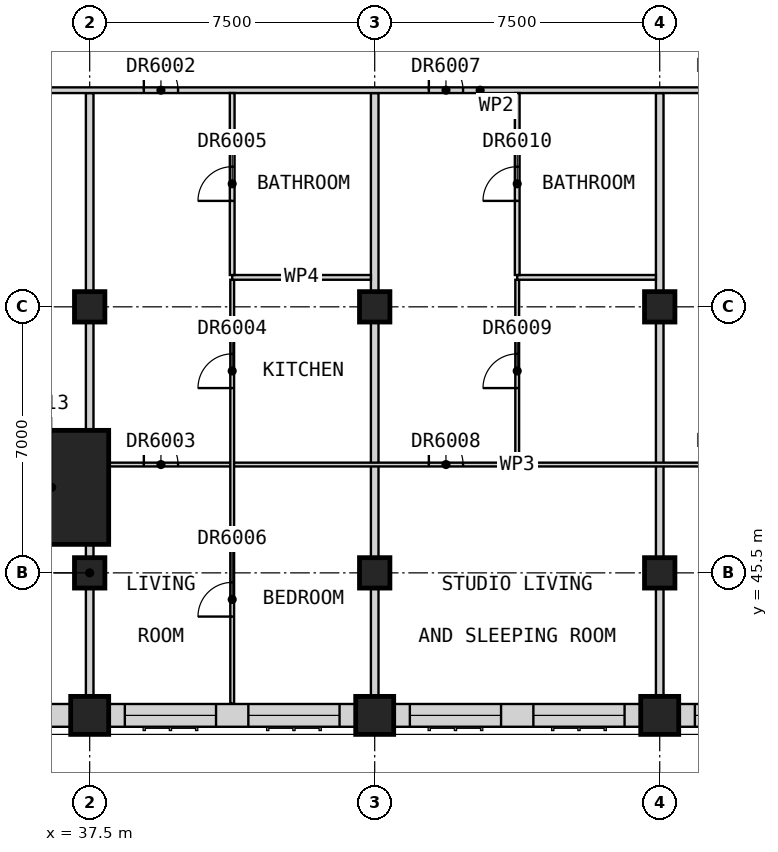
"""IFC4 building model, lengths in metres.
Left out: names, types, materials, properties, quantities, classifications, styles, units other than length and angle.
Written with IfcOpenShell. Run it as: python <this file> out.ifc"""

import sys

from ifc_helpers import new_model, si_unit, direction, frame, frame_2d, origin, origin_2d, place, context, subcontext, project, spatial, rectangle, extrude, element, fill, save


model = new_model("IFC4")
c1 = context("Model", 3, precision=1e-05, world=origin(), true_north=direction((0.0, 1.0)))
c2 = subcontext(c1, "Body", "Model", "MODEL_VIEW")
j1 = project(units=[si_unit("LENGTHUNIT", "METRE"), si_unit("PLANEANGLEUNIT", "RADIAN")], contexts=[c1])
p1 = place(None, origin())
s1 = spatial("IfcSite", under=j1, at=p1, CompositionType="ELEMENT")
p2 = place(p1, origin())
s2 = spatial("IfcBuilding", under=s1, at=p2, CompositionType="ELEMENT")
p3 = place(p2, frame((0.0, 0.0, 254.7)))
s3 = spatial("IfcBuildingStorey", under=s2, at=p3, CompositionType="ELEMENT", Elevation=254.7)
for number, where, z_axis, x_axis in (
    (1, (37.5, 41.75, 0.0), (0.0, 0.0, 1.0), (1.0, 0.0, 0.0)),
    (2, (45.0, 41.75, 0.0), (0.0, 0.0, 1.0), (1.0, 0.0, 0.0)),
    (3, (52.5, 41.75, 0.0), (0.0, 0.0, 1.0), (1.0, 0.0, 0.0)),
):
    element("IfcColumn", number, at=place(p3, frame(where, z_axis=z_axis, x_axis=x_axis)), inside=s3, PredefinedType="COLUMN", context=c2, shape_type="SweptSolid", body=[
        extrude(rectangle(XDim=1.0, YDim=1.0, at=origin_2d()), origin(), (0.0, 0.0, 1.0), 3.5),
    ])
for number, where, z_axis, x_axis in (
    (4, (37.5, 45.5, 0.0), (0.0, 0.0, 1.0), (1.0, 0.0, 0.0)),
    (5, (37.5, 52.5, 0.0), (0.0, 0.0, 1.0), (1.0, 0.0, 0.0)),
    (6, (45.0, 45.5, 0.0), (0.0, 0.0, 1.0), (1.0, 0.0, 0.0)),
    (7, (45.0, 52.5, 0.0), (0.0, 0.0, 1.0), (1.0, 0.0, 0.0)),
    (8, (52.5, 45.5, 0.0), (0.0, 0.0, 1.0), (1.0, 0.0, 0.0)),
    (9, (52.5, 52.5, 0.0), (0.0, 0.0, 1.0), (1.0, 0.0, 0.0)),
):
    element("IfcColumn", number, at=place(p3, frame(where, z_axis=z_axis, x_axis=x_axis)), inside=s3, PredefinedType="COLUMN", context=c2, shape_type="SweptSolid", body=[
        extrude(rectangle(XDim=0.8, YDim=0.8, at=origin_2d()), origin(), (0.0, 0.0, 1.0), 3.5),
    ])
p4 = place(p3, frame((36.5, 47.75, 0.0), z_axis=(0.0, 0.0, 1.0), x_axis=(1.0, 0.0, 0.0)))
e10 = element("IfcColumn", 10, at=p4, inside=s3, PredefinedType="COLUMN", context=c2, shape_type="SweptSolid", body=[
    extrude(rectangle(XDim=3.0, YDim=3.0, at=origin_2d()), origin(), (0.0, 0.0, 1.0), 3.5),
])
p5 = place(p3, frame((35.0, 41.75, 0.0), z_axis=(0.0, 0.0, 1.0), x_axis=(1.0, 0.0, 0.0)))
e11 = element("IfcWall", 11, at=p5, inside=s3, PredefinedType="SOLIDWALL", context=c2, shape_type="SweptSolid", body=[
    extrude(rectangle(XDim=2.0, YDim=0.6, at=frame_2d((1.0, 0.0))), origin(), (0.0, 0.0, 1.0), 3.1),
])
p6 = place(p3, frame((38.0, 41.75, 0.0), z_axis=(0.0, 0.0, 1.0), x_axis=(1.0, 0.0, 0.0)))
e12 = element("IfcWall", 12, at=p6, inside=s3, PredefinedType="SOLIDWALL", context=c2, shape_type="SweptSolid", body=[
    extrude(rectangle(XDim=6.5, YDim=0.6, at=frame_2d((3.25, 0.0))), origin(), (0.0, 0.0, 1.0), 2.75),
])
p7 = place(p6, frame((0.425, 0.0, 0.8)))
e13 = element("IfcOpeningElement", 13, at=p7, cuts=e12, PredefinedType="OPENING", context=c2, shape_type="SweptSolid", body=[
    extrude(rectangle(XDim=2.4, YDim=1.8, at=frame_2d((1.2, 0.9))), frame((0.0, 0.31, 0.0), z_axis=(0.0, -1.0, 0.0), x_axis=(1.0, 0.0, 0.0)), (0.0, 0.0, 1.0), 0.62),
])
p8 = place(p6, frame((3.675, 0.0, 0.8)))
e14 = element("IfcOpeningElement", 14, at=p8, cuts=e12, PredefinedType="OPENING", context=c2, shape_type="SweptSolid", body=[
    extrude(rectangle(XDim=2.4, YDim=1.8, at=frame_2d((1.2, 0.9))), frame((0.0, 0.31, 0.0), z_axis=(0.0, -1.0, 0.0), x_axis=(1.0, 0.0, 0.0)), (0.0, 0.0, 1.0), 0.62),
])
p9 = place(p3, frame((45.5, 41.75, 0.0), z_axis=(0.0, 0.0, 1.0), x_axis=(1.0, 0.0, 0.0)))
e15 = element("IfcWall", 15, at=p9, inside=s3, PredefinedType="SOLIDWALL", context=c2, shape_type="SweptSolid", body=[
    extrude(rectangle(XDim=6.5, YDim=0.6, at=frame_2d((3.25, 0.0))), origin(), (0.0, 0.0, 1.0), 2.75),
])
p10 = place(p9, frame((0.425, 0.0, 0.8)))
e16 = element("IfcOpeningElement", 16, at=p10, cuts=e15, PredefinedType="OPENING", context=c2, shape_type="SweptSolid", body=[
    extrude(rectangle(XDim=2.4, YDim=1.8, at=frame_2d((1.2, 0.9))), frame((0.0, 0.31, 0.0), z_axis=(0.0, -1.0, 0.0), x_axis=(1.0, 0.0, 0.0)), (0.0, 0.0, 1.0), 0.62),
])
p11 = place(p9, frame((3.675, 0.0, 0.8)))
e17 = element("IfcOpeningElement", 17, at=p11, cuts=e15, PredefinedType="OPENING", context=c2, shape_type="SweptSolid", body=[
    extrude(rectangle(XDim=2.4, YDim=1.8, at=frame_2d((1.2, 0.9))), frame((0.0, 0.31, 0.0), z_axis=(0.0, -1.0, 0.0), x_axis=(1.0, 0.0, 0.0)), (0.0, 0.0, 1.0), 0.62),
])
p12 = place(p3, frame((53.0, 41.75, 0.0), z_axis=(0.0, 0.0, 1.0), x_axis=(1.0, 0.0, 0.0)))
e18 = element("IfcWall", 18, at=p12, inside=s3, PredefinedType="SOLIDWALL", context=c2, shape_type="SweptSolid", body=[
    extrude(rectangle(XDim=6.5, YDim=0.6, at=frame_2d((3.25, 0.0))), origin(), (0.0, 0.0, 1.0), 2.75),
])
p13 = place(p12, frame((0.425, 0.0, 0.8)))
e19 = element("IfcOpeningElement", 19, at=p13, cuts=e18, PredefinedType="OPENING", context=c2, shape_type="SweptSolid", body=[
    extrude(rectangle(XDim=2.4, YDim=1.8, at=frame_2d((1.2, 0.9))), frame((0.0, 0.31, 0.0), z_axis=(0.0, -1.0, 0.0), x_axis=(1.0, 0.0, 0.0)), (0.0, 0.0, 1.0), 0.62),
])
p14 = place(p12, frame((3.675, 0.0, 0.8)))
e20 = element("IfcOpeningElement", 20, at=p14, cuts=e18, PredefinedType="OPENING", context=c2, shape_type="SweptSolid", body=[
    extrude(rectangle(XDim=2.4, YDim=1.8, at=frame_2d((1.2, 0.9))), frame((0.0, 0.31, 0.0), z_axis=(0.0, -1.0, 0.0), x_axis=(1.0, 0.0, 0.0)), (0.0, 0.0, 1.0), 0.62),
])
p15 = place(p3, frame((37.5, 41.25, 0.0), z_axis=(0.0, 0.0, 1.0), x_axis=(0.0, 1.0, 0.0)))
e21 = element("IfcWall", 21, at=p15, inside=s3, PredefinedType="PARTITIONING", context=c2, shape_type="SweptSolid", body=[
    extrude(rectangle(XDim=16.875, YDim=0.2, at=frame_2d((8.438, 0.0))), origin(), (0.0, 0.0, 1.0), 2.75),
])
for number, where, z_axis, x_axis in (
    (22, (45.0, 41.25, 0.0), (0.0, 0.0, 1.0), (0.0, 1.0, 0.0)),
    (23, (52.5, 41.25, 0.0), (0.0, 0.0, 1.0), (0.0, 1.0, 0.0)),
):
    element("IfcWall", number, at=place(p3, frame(where, z_axis=z_axis, x_axis=x_axis)), inside=s3, PredefinedType="PARTITIONING", context=c2, shape_type="SweptSolid", body=[
        extrude(rectangle(XDim=16.875, YDim=0.2, at=frame_2d((8.438, 0.0))), origin(), (0.0, 0.0, 1.0), 3.1),
    ])
p16 = place(p3, frame((33.75, 58.2, 0.0), z_axis=(0.0, 0.0, 1.0), x_axis=(1.0, 0.0, 0.0)))
e24 = element("IfcWall", 24, at=p16, inside=s3, PredefinedType="PARTITIONING", context=c2, shape_type="SweptSolid", body=[
    extrude(rectangle(XDim=28.05, YDim=0.15, at=frame_2d((14.025, 0.0))), origin(), (0.0, 0.0, 1.0), 3.1),
])
p17 = place(p16, frame((1.375, 0.0, 0.0)))
e25 = element("IfcOpeningElement", 25, at=p17, cuts=e24, PredefinedType="OPENING", context=c2, shape_type="SweptSolid", body=[
    extrude(rectangle(XDim=1.0, YDim=2.1, at=frame_2d((0.5, 1.05))), frame((0.0, 0.085, 0.0), z_axis=(0.0, -1.0, 0.0), x_axis=(1.0, 0.0, 0.0)), (0.0, 0.0, 1.0), 0.17),
])
p18 = place(p16, frame((5.175, 0.0, 0.0)))
e26 = element("IfcOpeningElement", 26, at=p18, cuts=e24, PredefinedType="OPENING", context=c2, shape_type="SweptSolid", body=[
    extrude(rectangle(XDim=0.9, YDim=2.1, at=frame_2d((0.45, 1.05))), frame((0.0, 0.085, 0.0), z_axis=(0.0, -1.0, 0.0), x_axis=(1.0, 0.0, 0.0)), (0.0, 0.0, 1.0), 0.17),
])
p19 = place(p16, frame((12.675, 0.0, 0.0)))
e27 = element("IfcOpeningElement", 27, at=p19, cuts=e24, PredefinedType="OPENING", context=c2, shape_type="SweptSolid", body=[
    extrude(rectangle(XDim=0.9, YDim=2.1, at=frame_2d((0.45, 1.05))), frame((0.0, 0.085, 0.0), z_axis=(0.0, -1.0, 0.0), x_axis=(1.0, 0.0, 0.0)), (0.0, 0.0, 1.0), 0.17),
])
p20 = place(p16, frame((20.175, 0.0, 0.0)))
e28 = element("IfcOpeningElement", 28, at=p20, cuts=e24, PredefinedType="OPENING", context=c2, shape_type="SweptSolid", body=[
    extrude(rectangle(XDim=0.9, YDim=2.1, at=frame_2d((0.45, 1.05))), frame((0.0, 0.085, 0.0), z_axis=(0.0, -1.0, 0.0), x_axis=(1.0, 0.0, 0.0)), (0.0, 0.0, 1.0), 0.17),
])
p21 = place(p16, frame((26.7, 0.0, 0.0)))
e29 = element("IfcOpeningElement", 29, at=p21, cuts=e24, PredefinedType="OPENING", context=c2, shape_type="SweptSolid", body=[
    extrude(rectangle(XDim=0.9, YDim=2.1, at=frame_2d((0.45, 1.05))), frame((0.0, 0.085, 0.0), z_axis=(0.0, -1.0, 0.0), x_axis=(1.0, 0.0, 0.0)), (0.0, 0.0, 1.0), 0.17),
])
p22 = place(p3, frame((37.6, 48.35, 0.0), z_axis=(0.0, 0.0, 1.0), x_axis=(1.0, 0.0, 0.0)))
e30 = element("IfcWall", 30, at=p22, inside=s3, PredefinedType="PARTITIONING", context=c2, shape_type="SweptSolid", body=[
    extrude(rectangle(XDim=22.3, YDim=0.1, at=frame_2d((11.15, 0.0))), origin(), (0.0, 0.0, 1.0), 3.1),
])
p23 = place(p22, frame((1.325, 0.0, 0.0)))
e31 = element("IfcOpeningElement", 31, at=p23, cuts=e30, PredefinedType="OPENING", context=c2, shape_type="SweptSolid", body=[
    extrude(rectangle(XDim=0.9, YDim=2.1, at=frame_2d((0.45, 1.05))), frame((0.0, 0.06, 0.0), z_axis=(0.0, -1.0, 0.0), x_axis=(1.0, 0.0, 0.0)), (0.0, 0.0, 1.0), 0.12),
])
p24 = place(p22, frame((8.825, 0.0, 0.0)))
e32 = element("IfcOpeningElement", 32, at=p24, cuts=e30, PredefinedType="OPENING", context=c2, shape_type="SweptSolid", body=[
    extrude(rectangle(XDim=0.9, YDim=2.1, at=frame_2d((0.45, 1.05))), frame((0.0, 0.06, 0.0), z_axis=(0.0, -1.0, 0.0), x_axis=(1.0, 0.0, 0.0)), (0.0, 0.0, 1.0), 0.12),
])
p25 = place(p22, frame((16.325, 0.0, 0.0)))
e33 = element("IfcOpeningElement", 33, at=p25, cuts=e30, PredefinedType="OPENING", context=c2, shape_type="SweptSolid", body=[
    extrude(rectangle(XDim=0.9, YDim=2.1, at=frame_2d((0.45, 1.05))), frame((0.0, 0.06, 0.0), z_axis=(0.0, -1.0, 0.0), x_axis=(1.0, 0.0, 0.0)), (0.0, 0.0, 1.0), 0.12),
])
p26 = place(p3, frame((41.25, 42.06, 0.0), z_axis=(0.0, 0.0, 1.0), x_axis=(0.0, 1.0, 0.0)))
e34 = element("IfcWall", 34, at=p26, inside=s3, PredefinedType="PARTITIONING", context=c2, shape_type="SweptSolid", body=[
    extrude(rectangle(XDim=11.152, YDim=0.1, at=frame_2d((5.576, 0.0))), origin(), (0.0, 0.0, 1.0), 3.1),
])
p27 = place(p26, frame((8.302, 0.0, 0.0)))
e35 = element("IfcOpeningElement", 35, at=p27, cuts=e34, PredefinedType="OPENING", context=c2, shape_type="SweptSolid", body=[
    extrude(rectangle(XDim=0.9, YDim=2.1, at=frame_2d((0.45, 1.05))), frame((0.0, 0.06, 0.0), z_axis=(0.0, -1.0, 0.0), x_axis=(1.0, 0.0, 0.0)), (0.0, 0.0, 1.0), 0.12),
])
p28 = place(p26, frame((2.29, 0.0, 0.0)))
e36 = element("IfcOpeningElement", 36, at=p28, cuts=e34, PredefinedType="OPENING", context=c2, shape_type="SweptSolid", body=[
    extrude(rectangle(XDim=0.9, YDim=2.1, at=frame_2d((0.45, 1.05))), frame((0.0, 0.06, 0.0), z_axis=(0.0, -1.0, 0.0), x_axis=(1.0, 0.0, 0.0)), (0.0, 0.0, 1.0), 0.12),
])
p29 = place(p3, frame((48.75, 48.4, 0.0), z_axis=(0.0, 0.0, 1.0), x_axis=(0.0, 1.0, 0.0)))
e37 = element("IfcWall", 37, at=p29, inside=s3, PredefinedType="PARTITIONING", context=c2, shape_type="SweptSolid", body=[
    extrude(rectangle(XDim=4.812, YDim=0.1, at=frame_2d((2.406, 0.0))), origin(), (0.0, 0.0, 1.0), 3.1),
])
p30 = place(p29, frame((1.962, 0.0, 0.0)))
e38 = element("IfcOpeningElement", 38, at=p30, cuts=e37, PredefinedType="OPENING", context=c2, shape_type="SweptSolid", body=[
    extrude(rectangle(XDim=0.9, YDim=2.1, at=frame_2d((0.45, 1.05))), frame((0.0, 0.06, 0.0), z_axis=(0.0, -1.0, 0.0), x_axis=(1.0, 0.0, 0.0)), (0.0, 0.0, 1.0), 0.12),
])
for number, where, z_axis, x_axis in (
    (39, (41.25, 53.275, 0.0), (0.0, 0.0, 1.0), (1.0, 0.0, 0.0)),
    (40, (48.75, 53.275, 0.0), (0.0, 0.0, 1.0), (1.0, 0.0, 0.0)),
):
    element("IfcWall", number, at=place(p3, frame(where, z_axis=z_axis, x_axis=x_axis)), inside=s3, PredefinedType="PARTITIONING", context=c2, shape_type="SweptSolid", body=[
        extrude(rectangle(XDim=3.65, YDim=0.125, at=frame_2d((1.825, 0.0))), origin(), (0.0, 0.0, 1.0), 3.1),
    ])
p31 = place(p3, frame((41.25, 53.337, 0.0), z_axis=(0.0, 0.0, 1.0), x_axis=(0.0, 1.0, 0.0)))
e41 = element("IfcWall", 41, at=p31, inside=s3, PredefinedType="PARTITIONING", context=c2, shape_type="SweptSolid", body=[
    extrude(rectangle(XDim=4.788, YDim=0.125, at=frame_2d((2.394, 0.0))), origin(), (0.0, 0.0, 1.0), 3.1),
])
p32 = place(p31, frame((1.95, 0.0, 0.0)))
e42 = element("IfcOpeningElement", 42, at=p32, cuts=e41, PredefinedType="OPENING", context=c2, shape_type="SweptSolid", body=[
    extrude(rectangle(XDim=0.9, YDim=2.1, at=frame_2d((0.45, 1.05))), frame((0.0, 0.073, 0.0), z_axis=(0.0, -1.0, 0.0), x_axis=(1.0, 0.0, 0.0)), (0.0, 0.0, 1.0), 0.145),
])
p33 = place(p3, frame((48.75, 53.337, 0.0), z_axis=(0.0, 0.0, 1.0), x_axis=(0.0, 1.0, 0.0)))
e43 = element("IfcWall", 43, at=p33, inside=s3, PredefinedType="PARTITIONING", context=c2, shape_type="SweptSolid", body=[
    extrude(rectangle(XDim=4.788, YDim=0.125, at=frame_2d((2.394, 0.0))), origin(), (0.0, 0.0, 1.0), 3.1),
])
p34 = place(p33, frame((1.95, 0.0, 0.0)))
e44 = element("IfcOpeningElement", 44, at=p34, cuts=e43, PredefinedType="OPENING", context=c2, shape_type="SweptSolid", body=[
    extrude(rectangle(XDim=0.9, YDim=2.1, at=frame_2d((0.45, 1.05))), frame((0.0, 0.073, 0.0), z_axis=(0.0, -1.0, 0.0), x_axis=(1.0, 0.0, 0.0)), (0.0, 0.0, 1.0), 0.145),
])
p35 = place(p7, origin())
e45 = element("IfcWindow", 45, at=p35, inside=s3, PartitioningType="SINGLE_PANEL", PredefinedType="WINDOW", context=c2, shape_type="SweptSolid", body=[
    extrude(rectangle(XDim=2.4, YDim=1.8, at=frame_2d((1.2, 0.9))), frame((0.0, -0.07, 0.0), z_axis=(0.0, -1.0, 0.0), x_axis=(1.0, 0.0, 0.0)), (0.0, 0.0, 1.0), 0.06),
])
fill(e13, e45)
p36 = place(p8, origin())
e46 = element("IfcWindow", 46, at=p36, inside=s3, PartitioningType="SINGLE_PANEL", PredefinedType="WINDOW", context=c2, shape_type="SweptSolid", body=[
    extrude(rectangle(XDim=2.4, YDim=1.8, at=frame_2d((1.2, 0.9))), frame((0.0, -0.07, 0.0), z_axis=(0.0, -1.0, 0.0), x_axis=(1.0, 0.0, 0.0)), (0.0, 0.0, 1.0), 0.06),
])
fill(e14, e46)
p37 = place(p10, origin())
e47 = element("IfcWindow", 47, at=p37, inside=s3, PartitioningType="SINGLE_PANEL", PredefinedType="WINDOW", context=c2, shape_type="SweptSolid", body=[
    extrude(rectangle(XDim=2.4, YDim=1.8, at=frame_2d((1.2, 0.9))), frame((0.0, -0.07, 0.0), z_axis=(0.0, -1.0, 0.0), x_axis=(1.0, 0.0, 0.0)), (0.0, 0.0, 1.0), 0.06),
])
fill(e16, e47)
p38 = place(p11, origin())
e48 = element("IfcWindow", 48, at=p38, inside=s3, PartitioningType="SINGLE_PANEL", PredefinedType="WINDOW", context=c2, shape_type="SweptSolid", body=[
    extrude(rectangle(XDim=2.4, YDim=1.8, at=frame_2d((1.2, 0.9))), frame((0.0, -0.07, 0.0), z_axis=(0.0, -1.0, 0.0), x_axis=(1.0, 0.0, 0.0)), (0.0, 0.0, 1.0), 0.06),
])
fill(e17, e48)
p39 = place(p13, origin())
e49 = element("IfcWindow", 49, at=p39, inside=s3, PartitioningType="SINGLE_PANEL", PredefinedType="WINDOW", context=c2, shape_type="SweptSolid", body=[
    extrude(rectangle(XDim=2.4, YDim=1.8, at=frame_2d((1.2, 0.9))), frame((0.0, -0.07, 0.0), z_axis=(0.0, -1.0, 0.0), x_axis=(1.0, 0.0, 0.0)), (0.0, 0.0, 1.0), 0.06),
])
fill(e19, e49)
p40 = place(p18, origin())
e50 = element("IfcDoor", 50, at=p40, inside=s3, OperationType="SINGLE_SWING_RIGHT", PredefinedType="DOOR", context=c2, shape_type="SweptSolid", body=[
    extrude(rectangle(XDim=0.9, YDim=2.1, at=frame_2d((0.45, 1.05))), frame((0.0, 0.025, 0.0), z_axis=(0.0, -1.0, 0.0), x_axis=(1.0, 0.0, 0.0)), (0.0, 0.0, 1.0), 0.05),
])
fill(e26, e50)
p41 = place(p23, origin())
e51 = element("IfcDoor", 51, at=p41, inside=s3, OperationType="SINGLE_SWING_LEFT", PredefinedType="DOOR", context=c2, shape_type="SweptSolid", body=[
    extrude(rectangle(XDim=0.9, YDim=2.1, at=frame_2d((0.45, 1.05))), frame((0.0, 0.025, 0.0), z_axis=(0.0, -1.0, 0.0), x_axis=(1.0, 0.0, 0.0)), (0.0, 0.0, 1.0), 0.05),
])
fill(e31, e51)
p42 = place(p27, origin())
e52 = element("IfcDoor", 52, at=p42, inside=s3, OperationType="SINGLE_SWING_LEFT", PredefinedType="DOOR", context=c2, shape_type="SweptSolid", body=[
    extrude(rectangle(XDim=0.9, YDim=2.1, at=frame_2d((0.45, 1.05))), frame((0.0, 0.025, 0.0), z_axis=(0.0, -1.0, 0.0), x_axis=(1.0, 0.0, 0.0)), (0.0, 0.0, 1.0), 0.05),
])
fill(e35, e52)
p43 = place(p32, origin())
e53 = element("IfcDoor", 53, at=p43, inside=s3, OperationType="SINGLE_SWING_RIGHT", PredefinedType="DOOR", context=c2, shape_type="SweptSolid", body=[
    extrude(rectangle(XDim=0.9, YDim=2.1, at=frame_2d((0.45, 1.05))), frame((0.0, 0.025, 0.0), z_axis=(0.0, -1.0, 0.0), x_axis=(1.0, 0.0, 0.0)), (0.0, 0.0, 1.0), 0.05),
])
fill(e42, e53)
p44 = place(p28, origin())
e54 = element("IfcDoor", 54, at=p44, inside=s3, OperationType="SINGLE_SWING_LEFT", PredefinedType="DOOR", context=c2, shape_type="SweptSolid", body=[
    extrude(rectangle(XDim=0.9, YDim=2.1, at=frame_2d((0.45, 1.05))), frame((0.0, 0.025, 0.0), z_axis=(0.0, -1.0, 0.0), x_axis=(1.0, 0.0, 0.0)), (0.0, 0.0, 1.0), 0.05),
])
fill(e36, e54)
p45 = place(p19, origin())
e55 = element("IfcDoor", 55, at=p45, inside=s3, OperationType="SINGLE_SWING_RIGHT", PredefinedType="DOOR", context=c2, shape_type="SweptSolid", body=[
    extrude(rectangle(XDim=0.9, YDim=2.1, at=frame_2d((0.45, 1.05))), frame((0.0, 0.025, 0.0), z_axis=(0.0, -1.0, 0.0), x_axis=(1.0, 0.0, 0.0)), (0.0, 0.0, 1.0), 0.05),
])
fill(e27, e55)
p46 = place(p24, origin())
e56 = element("IfcDoor", 56, at=p46, inside=s3, OperationType="SINGLE_SWING_LEFT", PredefinedType="DOOR", context=c2, shape_type="SweptSolid", body=[
    extrude(rectangle(XDim=0.9, YDim=2.1, at=frame_2d((0.45, 1.05))), frame((0.0, 0.025, 0.0), z_axis=(0.0, -1.0, 0.0), x_axis=(1.0, 0.0, 0.0)), (0.0, 0.0, 1.0), 0.05),
])
fill(e32, e56)
p47 = place(p30, origin())
e57 = element("IfcDoor", 57, at=p47, inside=s3, OperationType="SINGLE_SWING_LEFT", PredefinedType="DOOR", context=c2, shape_type="SweptSolid", body=[
    extrude(rectangle(XDim=0.9, YDim=2.1, at=frame_2d((0.45, 1.05))), frame((0.0, 0.025, 0.0), z_axis=(0.0, -1.0, 0.0), x_axis=(1.0, 0.0, 0.0)), (0.0, 0.0, 1.0), 0.05),
])
fill(e38, e57)
p48 = place(p34, origin())
e58 = element("IfcDoor", 58, at=p48, inside=s3, OperationType="SINGLE_SWING_RIGHT", PredefinedType="DOOR", context=c2, shape_type="SweptSolid", body=[
    extrude(rectangle(XDim=0.9, YDim=2.1, at=frame_2d((0.45, 1.05))), frame((0.0, 0.025, 0.0), z_axis=(0.0, -1.0, 0.0), x_axis=(1.0, 0.0, 0.0)), (0.0, 0.0, 1.0), 0.05),
])
fill(e44, e58)
save(model, sys.argv[1])
